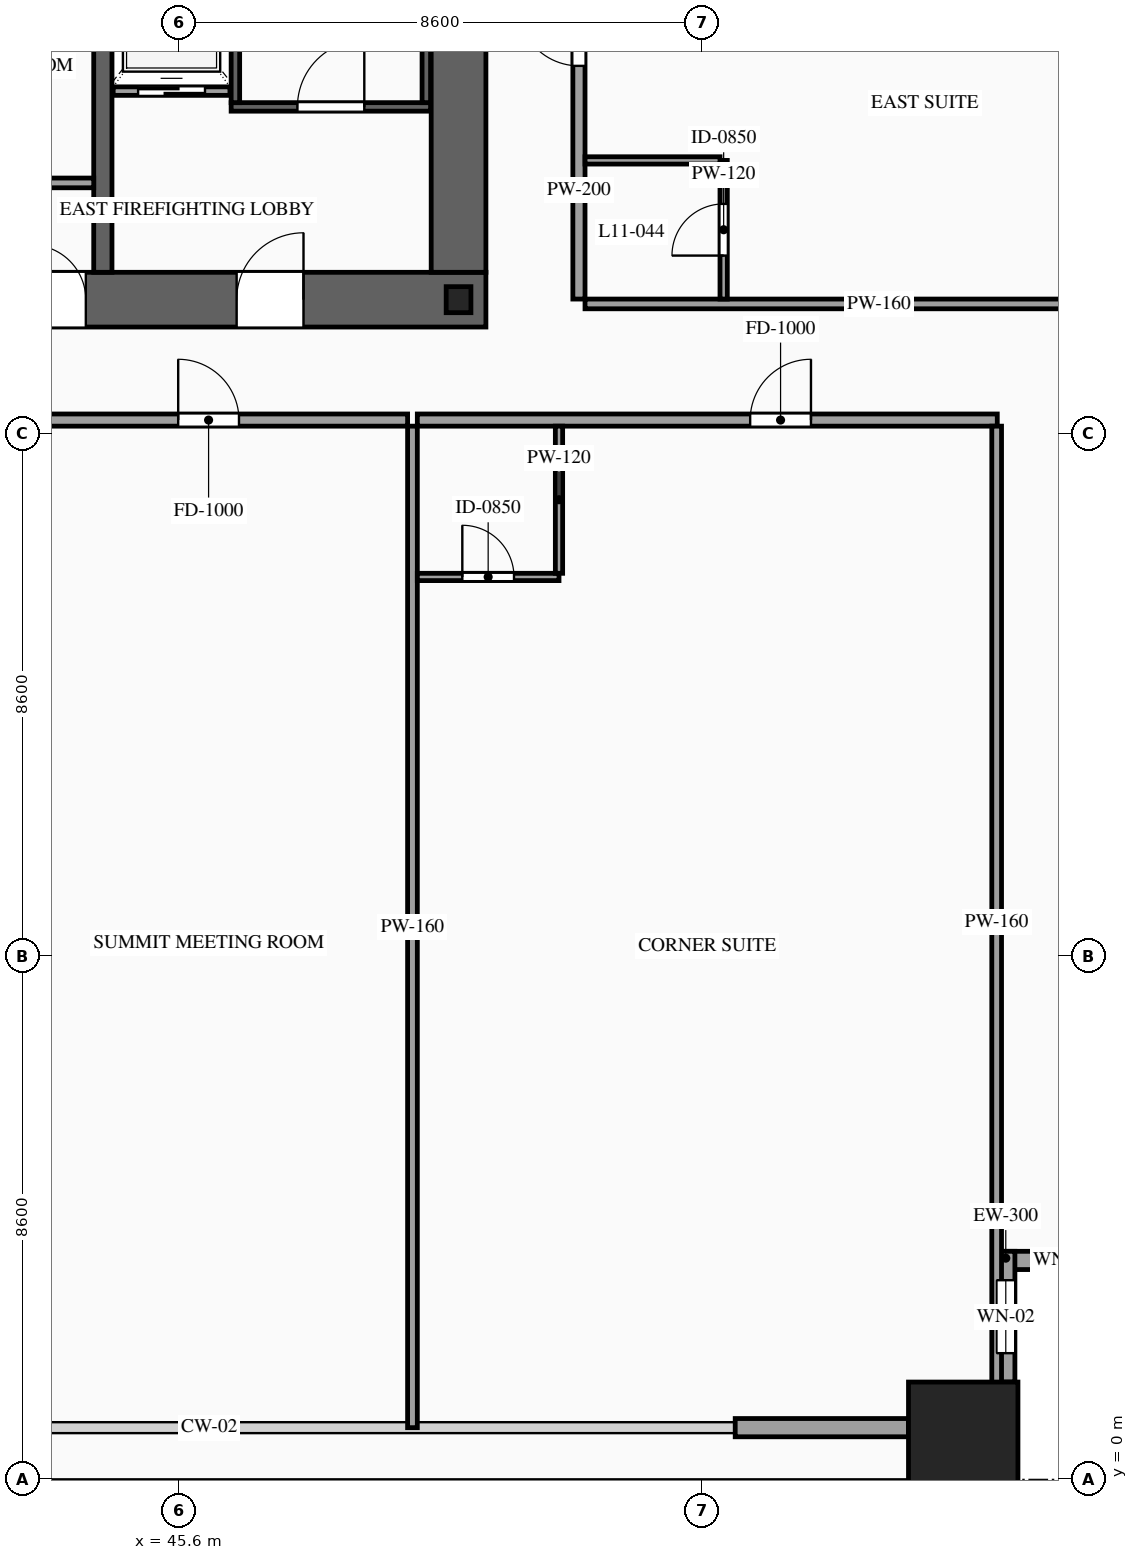
"""IFC4 building model, lengths in metres.
Left out: names, types, materials, properties, quantities, classifications, styles, units other than length and angle.
Written with IfcOpenShell. Run it as: python <this file> out.ifc"""

import sys

from ifc_helpers import new_model, si_unit, direction, frame, frame_2d, origin, origin_2d, place, context, subcontext, project, spatial, rectangle, hollow_rectangle, i_section, extrude, source, transform, mapped, element, fill, save


model = new_model("IFC4")
c1 = context("Model", 3, precision=1e-05, world=origin(), true_north=direction((0.0, 1.0)))
c2 = subcontext(c1, "Body", "Model", "MODEL_VIEW")
j1 = project(units=[si_unit("LENGTHUNIT", "METRE"), si_unit("PLANEANGLEUNIT", "RADIAN")], contexts=[c1])
p1 = place(None, origin())
s1 = spatial("IfcSite", under=j1, at=p1, CompositionType="ELEMENT")
p2 = place(p1, origin())
s2 = spatial("IfcBuilding", under=s1, at=p2, CompositionType="ELEMENT")
p3 = place(p2, frame((0.0, 0.0, 46.0)))
s3 = spatial("IfcBuildingStorey", under=s2, at=p3, CompositionType="ELEMENT", Elevation=46.0)
p4 = place(p3, frame((23.35, 19.4, 0.0), z_axis=(0.0, 0.0, 1.0), x_axis=(1.0, 0.0, 0.0)))
e1 = element("IfcWall", 1, at=p4, inside=s3, PredefinedType="SHEAR", context=c2, shape_type="SweptSolid", body=[
    extrude(rectangle(XDim=27.3, YDim=0.9, at=frame_2d((13.65, 0.0))), origin(), (0.0, 0.0, 1.0), 3.6),
])
p5 = place(p4, frame((2.1, 0.0, 0.0)))
e2 = element("IfcOpeningElement", 2, at=p5, cuts=e1, PredefinedType="OPENING", context=c2, shape_type="SweptSolid", body=[
    extrude(rectangle(XDim=1.1, YDim=2.2, at=frame_2d((0.55, 1.1))), frame((0.0, 0.465, 0.0), z_axis=(0.0, -1.0, 0.0), x_axis=(1.0, 0.0, 0.0)), (0.0, 0.0, 1.0), 0.93),
])
p6 = place(p4, frame((10.0, 0.0, 0.0)))
e3 = element("IfcOpeningElement", 3, at=p6, cuts=e1, PredefinedType="OPENING", context=c2, shape_type="SweptSolid", body=[
    extrude(rectangle(XDim=1.1, YDim=2.2, at=frame_2d((0.55, 1.1))), frame((0.0, 0.465, 0.0), z_axis=(0.0, -1.0, 0.0), x_axis=(1.0, 0.0, 0.0)), (0.0, 0.0, 1.0), 0.93),
])
p7 = place(p4, frame((23.2, 0.0, 0.0)))
e4 = element("IfcOpeningElement", 4, at=p7, cuts=e1, PredefinedType="OPENING", context=c2, shape_type="SweptSolid", body=[
    extrude(rectangle(XDim=1.1, YDim=2.2, at=frame_2d((0.55, 1.1))), frame((0.0, 0.465, 0.0), z_axis=(0.0, -1.0, 0.0), x_axis=(1.0, 0.0, 0.0)), (0.0, 0.0, 1.0), 0.93),
])
p8 = place(p4, frame((19.82, 0.0, 0.0)))
e5 = element("IfcOpeningElement", 5, at=p8, cuts=e1, PredefinedType="OPENING", context=c2, shape_type="SweptSolid", body=[
    extrude(rectangle(XDim=0.9, YDim=2.15, at=frame_2d((0.45, 1.075))), frame((0.0, 0.465, 0.0), z_axis=(0.0, -1.0, 0.0), x_axis=(1.0, 0.0, 0.0)), (0.0, 0.0, 1.0), 0.93),
])
p9 = place(p4, frame((18.38, 0.0, 0.0)))
e6 = element("IfcOpeningElement", 6, at=p9, cuts=e1, PredefinedType="OPENING", context=c2, shape_type="SweptSolid", body=[
    extrude(rectangle(XDim=0.9, YDim=2.15, at=frame_2d((0.45, 1.075))), frame((0.0, 0.465, 0.0), z_axis=(0.0, -1.0, 0.0), x_axis=(1.0, 0.0, 0.0)), (0.0, 0.0, 1.0), 0.93),
])
m1 = source(origin(), c2, "Body", "SweptSolid", [
    extrude(rectangle(XDim=11.9, YDim=0.9, at=frame_2d((5.95, 0.0))), origin(), (0.0, 0.0, 1.0), 3.6),
])
p10 = place(p3, frame((50.2, 19.85, 0.0), z_axis=(0.0, 0.0, 1.0), x_axis=(0.0, 1.0, 0.0)))
e7 = element("IfcWall", 7, at=p10, inside=s3, PredefinedType="SHEAR", context=c2, shape_type="MappedRepresentation", body=[
    mapped(m1, transform((0.0, 0.0, 0.0), scale=1.0)),
])
m2 = source(origin(), c2, "Body", "SweptSolid", [
    extrude(rectangle(XDim=11.9, YDim=0.3, at=frame_2d((5.95, 0.0))), origin(), (0.0, 0.0, 1.0), 3.6),
])
p11 = place(p3, frame((44.35, 19.85, 0.0), z_axis=(0.0, 0.0, 1.0), x_axis=(0.0, 1.0, 0.0)))
e8 = element("IfcWall", 8, at=p11, inside=s3, PredefinedType="SOLIDWALL", context=c2, shape_type="MappedRepresentation", body=[
    mapped(m2, transform((0.0, 0.0, 0.0), scale=1.0)),
])
m3 = source(origin(), c2, "Body", "SweptSolid", [
    extrude(i_section(OverallWidth=0.407, OverallDepth=0.428, WebThickness=0.02, FlangeThickness=0.035, at=origin_2d()), origin(), (0.0, 0.0, 1.0), 3.6),
])
p12 = place(p3, frame((50.2, 19.4, 0.0), z_axis=(0.0, 0.0, 1.0), x_axis=(1.0, 0.0, 0.0)))
e9 = element("IfcColumn", 9, at=p12, inside=s3, PredefinedType="COLUMN", context=c2, shape_type="MappedRepresentation", body=[
    mapped(m3, transform((0.0, 0.0, 0.0), scale=1.0)),
])
m4 = source(origin(), c2, "Body", "SweptSolid", [
    extrude(hollow_rectangle(XDim=1.8, YDim=1.8, WallThickness=0.08, at=origin_2d()), origin(), (0.0, 0.0, 1.0), 3.6),
])
p13 = place(p3, frame((58.5, 0.7, 0.0), z_axis=(0.0, 0.0, 1.0), x_axis=(1.0, 0.0, 0.0)))
e10 = element("IfcColumn", 10, at=p13, inside=s3, PredefinedType="COLUMN", context=c2, shape_type="MappedRepresentation", body=[
    mapped(m4, transform((0.0, 0.0, 0.0), scale=1.0)),
])
p14 = place(p3, frame((59.05, 3.6, 0.0), z_axis=(0.0, 0.0, 1.0), x_axis=(1.0, 0.0, 0.0)))
e11 = element("IfcWall", 11, at=p14, inside=s3, PredefinedType="SOLIDWALL", context=c2, shape_type="SweptSolid", body=[
    extrude(rectangle(XDim=2.15, YDim=0.3, at=frame_2d((1.075, 0.0))), origin(), (0.0, 0.0, 1.0), 3.38),
])
p15 = place(p14, frame((0.625, 0.0, 0.85)))
e12 = element("IfcOpeningElement", 12, at=p15, cuts=e11, PredefinedType="OPENING", context=c2, shape_type="SweptSolid", body=[
    extrude(rectangle(XDim=0.9, YDim=1.5, at=frame_2d((0.45, 0.75))), frame((0.0, 0.165, 0.0), z_axis=(0.0, -1.0, 0.0), x_axis=(1.0, 0.0, 0.0)), (0.0, 0.0, 1.0), 0.33),
])
p16 = place(p3, frame((59.2, 1.6, 0.0), z_axis=(0.0, 0.0, 1.0), x_axis=(0.0, 1.0, 0.0)))
e13 = element("IfcWall", 13, at=p16, inside=s3, PredefinedType="SOLIDWALL", context=c2, shape_type="SweptSolid", body=[
    extrude(rectangle(XDim=2.15, YDim=0.3, at=frame_2d((1.075, 0.0))), origin(), (0.0, 0.0, 1.0), 3.38),
])
p17 = place(p16, frame((0.475, 0.0, 0.85)))
e14 = element("IfcOpeningElement", 14, at=p17, cuts=e13, PredefinedType="OPENING", context=c2, shape_type="SweptSolid", body=[
    extrude(rectangle(XDim=1.2, YDim=2.1, at=frame_2d((0.6, 1.05))), frame((0.0, 0.165, 0.0), z_axis=(0.0, -1.0, 0.0), x_axis=(1.0, 0.0, 0.0)), (0.0, 0.0, 1.0), 0.33),
])
m5 = source(origin(), c2, "Body", "SweptSolid", [
    extrude(rectangle(XDim=2.85, YDim=0.3, at=frame_2d((1.425, 0.0))), origin(), (0.0, 0.0, 1.0), 2.775),
])
p18 = place(p3, frame((54.75, 0.85, 0.0), z_axis=(0.0, 0.0, 1.0), x_axis=(1.0, 0.0, 0.0)))
e15 = element("IfcWall", 15, at=p18, inside=s3, PredefinedType="SOLIDWALL", context=c2, shape_type="MappedRepresentation", body=[
    mapped(m5, transform((0.0, 0.0, 0.0), scale=1.0)),
])
p19 = place(p3, frame((44.52, 22.83, 0.0), z_axis=(0.0, 0.0, 1.0), x_axis=(1.0, 0.0, 0.0)))
e16 = element("IfcWall", 16, at=p19, inside=s3, PredefinedType="SOLIDWALL", context=c2, shape_type="SweptSolid", body=[
    extrude(rectangle(XDim=1.92, YDim=0.14, at=frame_2d((0.96, 0.0))), origin(), (0.0, 0.0, 1.0), 3.38),
])
p20 = place(p19, frame((0.41, 0.0, 0.0)))
e17 = element("IfcOpeningElement", 17, at=p20, cuts=e16, PredefinedType="OPENING", context=c2, shape_type="SweptSolid", body=[
    extrude(rectangle(XDim=1.1, YDim=2.2, at=frame_2d((0.55, 1.1))), frame((0.0, 0.085, 0.0), z_axis=(0.0, -1.0, 0.0), x_axis=(1.0, 0.0, 0.0)), (0.0, 0.0, 1.0), 0.17),
])
p21 = place(p3, frame((46.46, 22.57, 0.0), z_axis=(0.0, 0.0, 1.0), x_axis=(1.0, 0.0, 0.0)))
e18 = element("IfcWall", 18, at=p21, inside=s3, PredefinedType="SOLIDWALL", context=c2, shape_type="SweptSolid", body=[
    extrude(rectangle(XDim=3.28, YDim=0.14, at=frame_2d((1.64, 0.0))), origin(), (0.0, 0.0, 1.0), 3.38),
])
p22 = place(p21, frame((1.09, 0.0, 0.0)))
e19 = element("IfcOpeningElement", 19, at=p22, cuts=e18, PredefinedType="OPENING", context=c2, shape_type="SweptSolid", body=[
    extrude(rectangle(XDim=1.1, YDim=2.2, at=frame_2d((0.55, 1.1))), frame((0.0, 0.085, 0.0), z_axis=(0.0, -1.0, 0.0), x_axis=(1.0, 0.0, 0.0)), (0.0, 0.0, 1.0), 0.17),
])
m6 = source(origin(), c2, "Body", "SweptSolid", [
    extrude(rectangle(XDim=8.94, YDim=0.14, at=frame_2d((4.47, 0.0))), origin(), (0.0, 0.0, 1.0), 3.38),
])
for number, where, z_axis, x_axis in (
    (20, (46.53, 22.64, 0.0), (0.0, 0.0, 1.0), (0.0, 1.0, 0.0)),
    (21, (49.67, 22.64, 0.0), (0.0, 0.0, 1.0), (0.0, 1.0, 0.0)),
):
    element("IfcWall", number, at=place(p3, frame(where, z_axis=z_axis, x_axis=x_axis)), inside=s3, PredefinedType="SOLIDWALL", context=c2, shape_type="MappedRepresentation", body=[
        mapped(m6, transform((0.0, 0.0, 0.0), scale=1.0)),
    ])
m7 = source(origin(), c2, "Body", "SweptSolid", [
    extrude(rectangle(XDim=1.17, YDim=0.16, at=frame_2d((0.585, 0.0))), origin(), (0.0, 0.0, 1.0), 3.38),
])
p23 = place(p3, frame((43.03, 21.32, 0.0), z_axis=(0.0, 0.0, 1.0), x_axis=(1.0, 0.0, 0.0)))
e22 = element("IfcWall", 22, at=p23, inside=s3, PredefinedType="PARTITIONING", context=c2, shape_type="MappedRepresentation", body=[
    mapped(m7, transform((0.0, 0.0, 0.0), scale=1.0)),
])
p24 = place(p3, frame((42.816, 17.42, 0.0), z_axis=(0.0, 0.0, 1.0), x_axis=(1.0, 0.0, 0.0)))
e23 = element("IfcWall", 23, at=p24, inside=s3, PredefinedType="PARTITIONING", context=c2, shape_type="SweptSolid", body=[
    extrude(rectangle(XDim=6.546, YDim=0.2, at=frame_2d((3.273, 0.0))), origin(), (0.0, 0.0, 1.0), 3.38),
])
p25 = place(p24, frame((2.773, 0.0, 0.0)))
e24 = element("IfcOpeningElement", 24, at=p25, cuts=e23, PredefinedType="OPENING", context=c2, shape_type="SweptSolid", body=[
    extrude(rectangle(XDim=1.0, YDim=2.2, at=frame_2d((0.5, 1.1))), frame((0.0, 0.115, 0.0), z_axis=(0.0, -1.0, 0.0), x_axis=(1.0, 0.0, 0.0)), (0.0, 0.0, 1.0), 0.23),
])
m8 = source(origin(), c2, "Body", "SweptSolid", [
    extrude(rectangle(XDim=16.47, YDim=0.16, at=frame_2d((8.235, 0.0))), origin(), (0.0, 0.0, 1.0), 3.38),
])
p26 = place(p3, frame((49.442, 0.85, 0.0), z_axis=(0.0, 0.0, 1.0), x_axis=(0.0, 1.0, 0.0)))
e25 = element("IfcWall", 25, at=p26, inside=s3, PredefinedType="PARTITIONING", context=c2, shape_type="MappedRepresentation", body=[
    mapped(m8, transform((0.0, 0.0, 0.0), scale=1.0)),
])
p27 = place(p3, frame((49.522, 17.42, 0.0), z_axis=(0.0, 0.0, 1.0), x_axis=(1.0, 0.0, 0.0)))
e26 = element("IfcWall", 26, at=p27, inside=s3, PredefinedType="PARTITIONING", context=c2, shape_type="SweptSolid", body=[
    extrude(rectangle(XDim=9.538, YDim=0.2, at=frame_2d((4.769, 0.0))), origin(), (0.0, 0.0, 1.0), 3.38),
])
p28 = place(p27, frame((5.474, 0.0, 0.0)))
e27 = element("IfcOpeningElement", 27, at=p28, cuts=e26, PredefinedType="OPENING", context=c2, shape_type="SweptSolid", body=[
    extrude(rectangle(XDim=1.0, YDim=2.2, at=frame_2d((0.5, 1.1))), frame((0.0, 0.115, 0.0), z_axis=(0.0, -1.0, 0.0), x_axis=(1.0, 0.0, 0.0)), (0.0, 0.0, 1.0), 0.23),
])
m9 = source(origin(), c2, "Body", "SweptSolid", [
    extrude(rectangle(XDim=16.32, YDim=0.16, at=frame_2d((8.16, 0.0))), origin(), (0.0, 0.0, 1.0), 3.38),
])
p29 = place(p3, frame((59.05, 1.0, 0.0), z_axis=(0.0, 0.0, 1.0), x_axis=(0.0, 1.0, 0.0)))
e28 = element("IfcWall", 28, at=p29, inside=s3, PredefinedType="PARTITIONING", context=c2, shape_type="MappedRepresentation", body=[
    mapped(m9, transform((0.0, 0.0, 0.0), scale=1.0)),
])
p30 = place(p3, frame((49.522, 14.84, 0.0), z_axis=(0.0, 0.0, 1.0), x_axis=(1.0, 0.0, 0.0)))
e29 = element("IfcWall", 29, at=p30, inside=s3, PredefinedType="PARTITIONING", context=c2, shape_type="SweptSolid", body=[
    extrude(rectangle(XDim=2.33, YDim=0.12, at=frame_2d((1.165, 0.0))), origin(), (0.0, 0.0, 1.0), 3.38),
])
p31 = place(p30, frame((0.74, 0.0, 0.0)))
e30 = element("IfcOpeningElement", 30, at=p31, cuts=e29, PredefinedType="OPENING", context=c2, shape_type="SweptSolid", body=[
    extrude(rectangle(XDim=0.85, YDim=2.1, at=frame_2d((0.425, 1.05))), frame((0.0, 0.075, 0.0), z_axis=(0.0, -1.0, 0.0), x_axis=(1.0, 0.0, 0.0)), (0.0, 0.0, 1.0), 0.15),
])
m10 = source(origin(), c2, "Body", "SweptSolid", [
    extrude(rectangle(XDim=2.42, YDim=0.12, at=frame_2d((1.21, 0.0))), origin(), (0.0, 0.0, 1.0), 3.38),
])
p32 = place(p3, frame((51.852, 14.9, 0.0), z_axis=(0.0, 0.0, 1.0), x_axis=(0.0, 1.0, 0.0)))
e31 = element("IfcWall", 31, at=p32, inside=s3, PredefinedType="PARTITIONING", context=c2, shape_type="MappedRepresentation", body=[
    mapped(m10, transform((0.0, 0.0, 0.0), scale=1.0)),
])
p33 = place(p3, frame((52.18, 19.41, 0.0), z_axis=(0.0, 0.0, 1.0), x_axis=(0.0, 1.0, 0.0)))
e32 = element("IfcWall", 32, at=p33, inside=s3, PredefinedType="PARTITIONING", context=c2, shape_type="SweptSolid", body=[
    extrude(rectangle(XDim=6.31, YDim=0.2, at=frame_2d((3.155, 0.0))), origin(), (0.0, 0.0, 1.0), 3.38),
])
p34 = place(p33, frame((3.835, 0.0, 0.0)))
e33 = element("IfcOpeningElement", 33, at=p34, cuts=e32, PredefinedType="OPENING", context=c2, shape_type="SweptSolid", body=[
    extrude(rectangle(XDim=1.0, YDim=2.2, at=frame_2d((0.5, 1.1))), frame((0.0, 0.115, 0.0), z_axis=(0.0, -1.0, 0.0), x_axis=(1.0, 0.0, 0.0)), (0.0, 0.0, 1.0), 0.23),
])
m11 = source(origin(), c2, "Body", "SweptSolid", [
    extrude(rectangle(XDim=9.67, YDim=0.16, at=frame_2d((4.835, 0.0))), origin(), (0.0, 0.0, 1.0), 2.875),
])
p35 = place(p3, frame((52.28, 19.33, 0.0), z_axis=(0.0, 0.0, 1.0), x_axis=(1.0, 0.0, 0.0)))
e34 = element("IfcWall", 34, at=p35, inside=s3, PredefinedType="PARTITIONING", context=c2, shape_type="MappedRepresentation", body=[
    mapped(m11, transform((0.0, 0.0, 0.0), scale=1.0)),
])
p36 = place(p3, frame((54.56, 19.41, 0.0), z_axis=(0.0, 0.0, 1.0), x_axis=(0.0, 1.0, 0.0)))
e35 = element("IfcWall", 35, at=p36, inside=s3, PredefinedType="PARTITIONING", context=c2, shape_type="SweptSolid", body=[
    extrude(rectangle(XDim=2.28, YDim=0.12, at=frame_2d((1.14, 0.0))), origin(), (0.0, 0.0, 1.0), 3.38),
])
p37 = place(p36, frame((0.715, 0.0, 0.0)))
e36 = element("IfcOpeningElement", 36, at=p37, cuts=e35, PredefinedType="OPENING", context=c2, shape_type="SweptSolid", body=[
    extrude(rectangle(XDim=0.85, YDim=2.1, at=frame_2d((0.425, 1.05))), frame((0.0, 0.075, 0.0), z_axis=(0.0, -1.0, 0.0), x_axis=(1.0, 0.0, 0.0)), (0.0, 0.0, 1.0), 0.15),
])
m12 = source(origin(), c2, "Body", "SweptSolid", [
    extrude(rectangle(XDim=2.22, YDim=0.12, at=frame_2d((1.11, 0.0))), origin(), (0.0, 0.0, 1.0), 3.38),
])
p38 = place(p3, frame((52.28, 21.69, 0.0), z_axis=(0.0, 0.0, 1.0), x_axis=(1.0, 0.0, 0.0)))
e37 = element("IfcWall", 37, at=p38, inside=s3, PredefinedType="PARTITIONING", context=c2, shape_type="MappedRepresentation", body=[
    mapped(m12, transform((0.0, 0.0, 0.0), scale=1.0)),
])
m13 = source(origin(), c2, "Body", "SweptSolid", [
    extrude(rectangle(XDim=0.9, YDim=1.5, at=frame_2d((0.45, 0.75))), frame((0.0, 0.03, 0.0), z_axis=(0.0, -1.0, 0.0), x_axis=(1.0, 0.0, 0.0)), (0.0, 0.0, 1.0), 0.06),
])
p39 = place(p15, origin())
e38 = element("IfcWindow", 38, at=p39, inside=s3, PartitioningType="SINGLE_PANEL", PredefinedType="WINDOW", context=c2, shape_type="MappedRepresentation", body=[
    mapped(m13, transform((0.0, 0.0, 0.0), scale=1.0)),
])
fill(e12, e38)
m14 = source(origin(), c2, "Body", "SweptSolid", [
    extrude(rectangle(XDim=1.2, YDim=2.1, at=frame_2d((0.6, 1.05))), frame((0.0, 0.03, 0.0), z_axis=(0.0, -1.0, 0.0), x_axis=(1.0, 0.0, 0.0)), (0.0, 0.0, 1.0), 0.06),
])
p40 = place(p17, origin())
e39 = element("IfcWindow", 39, at=p40, inside=s3, PartitioningType="SINGLE_PANEL", PredefinedType="WINDOW", context=c2, shape_type="MappedRepresentation", body=[
    mapped(m14, transform((0.0, 0.0, 0.0), scale=1.0)),
])
fill(e14, e39)
m15 = source(origin(), c2, "Body", "SweptSolid", [
    extrude(rectangle(XDim=1.1, YDim=2.2, at=frame_2d((0.55, 1.1))), frame((0.0, 0.025, 0.0), z_axis=(0.0, -1.0, 0.0), x_axis=(1.0, 0.0, 0.0)), (0.0, 0.0, 1.0), 0.05),
])
p41 = place(p20, origin())
e40 = element("IfcDoor", 40, at=p41, inside=s3, OperationType="SLIDING_TO_RIGHT", PredefinedType="DOOR", context=c2, shape_type="MappedRepresentation", body=[
    mapped(m15, transform((0.0, 0.0, 0.0), scale=1.0)),
])
fill(e17, e40)
m16 = source(origin(), c2, "Body", "SweptSolid", [
    extrude(rectangle(XDim=1.1, YDim=2.2, at=frame_2d((0.55, 1.1))), frame((0.0, 0.025, 0.0), z_axis=(0.0, -1.0, 0.0), x_axis=(1.0, 0.0, 0.0)), (0.0, 0.0, 1.0), 0.05),
])
p42 = place(p22, origin())
e41 = element("IfcDoor", 41, at=p42, inside=s3, OperationType="SINGLE_SWING_RIGHT", PredefinedType="DOOR", context=c2, shape_type="MappedRepresentation", body=[
    mapped(m16, transform((0.0, 0.0, 0.0), scale=1.0)),
])
fill(e19, e41)
p43 = place(p7, origin())
e42 = element("IfcDoor", 42, at=p43, inside=s3, OperationType="SINGLE_SWING_RIGHT", PredefinedType="DOOR", context=c2, shape_type="MappedRepresentation", body=[
    mapped(m16, transform((0.0, 0.0, 0.0), scale=1.0)),
])
fill(e4, e42)
m17 = source(origin(), c2, "Body", "SweptSolid", [
    extrude(rectangle(XDim=0.9, YDim=2.15, at=frame_2d((0.45, 1.075))), frame((0.0, 0.025, 0.0), z_axis=(0.0, -1.0, 0.0), x_axis=(1.0, 0.0, 0.0)), (0.0, 0.0, 1.0), 0.05),
])
p44 = place(p8, origin())
e43 = element("IfcDoor", 43, at=p44, inside=s3, OperationType="SINGLE_SWING_LEFT", PredefinedType="DOOR", context=c2, shape_type="MappedRepresentation", body=[
    mapped(m17, transform((0.0, 0.0, 0.0), scale=1.0)),
])
fill(e5, e43)
m18 = source(origin(), c2, "Body", "SweptSolid", [
    extrude(rectangle(XDim=1.0, YDim=2.2, at=frame_2d((0.5, 1.1))), frame((0.0, 0.025, 0.0), z_axis=(0.0, -1.0, 0.0), x_axis=(1.0, 0.0, 0.0)), (0.0, 0.0, 1.0), 0.05),
])
p45 = place(p25, origin())
e44 = element("IfcDoor", 44, at=p45, inside=s3, OperationType="SINGLE_SWING_LEFT", PredefinedType="DOOR", context=c2, shape_type="MappedRepresentation", body=[
    mapped(m18, transform((0.0, 0.0, 0.0), scale=1.0)),
])
fill(e24, e44)
p46 = place(p28, origin())
e45 = element("IfcDoor", 45, at=p46, inside=s3, OperationType="SINGLE_SWING_RIGHT", PredefinedType="DOOR", context=c2, shape_type="MappedRepresentation", body=[
    mapped(m18, transform((0.0, 0.0, 0.0), scale=1.0)),
])
fill(e27, e45)
m19 = source(origin(), c2, "Body", "SweptSolid", [
    extrude(rectangle(XDim=0.85, YDim=2.1, at=frame_2d((0.425, 1.05))), frame((0.0, 0.025, 0.0), z_axis=(0.0, -1.0, 0.0), x_axis=(1.0, 0.0, 0.0)), (0.0, 0.0, 1.0), 0.05),
])
p47 = place(p31, origin())
e46 = element("IfcDoor", 46, at=p47, inside=s3, OperationType="SINGLE_SWING_LEFT", PredefinedType="DOOR", context=c2, shape_type="MappedRepresentation", body=[
    mapped(m19, transform((0.0, 0.0, 0.0), scale=1.0)),
])
fill(e30, e46)
p48 = place(p34, origin())
e47 = element("IfcDoor", 47, at=p48, inside=s3, OperationType="SINGLE_SWING_RIGHT", PredefinedType="DOOR", context=c2, shape_type="MappedRepresentation", body=[
    mapped(m18, transform((0.0, 0.0, 0.0), scale=1.0)),
])
fill(e33, e47)
p49 = place(p37, origin())
e48 = element("IfcDoor", 48, at=p49, inside=s3, OperationType="SINGLE_SWING_LEFT", PredefinedType="DOOR", context=c2, shape_type="MappedRepresentation", body=[
    mapped(m19, transform((0.0, 0.0, 0.0), scale=1.0)),
])
fill(e36, e48)
save(model, sys.argv[1])
